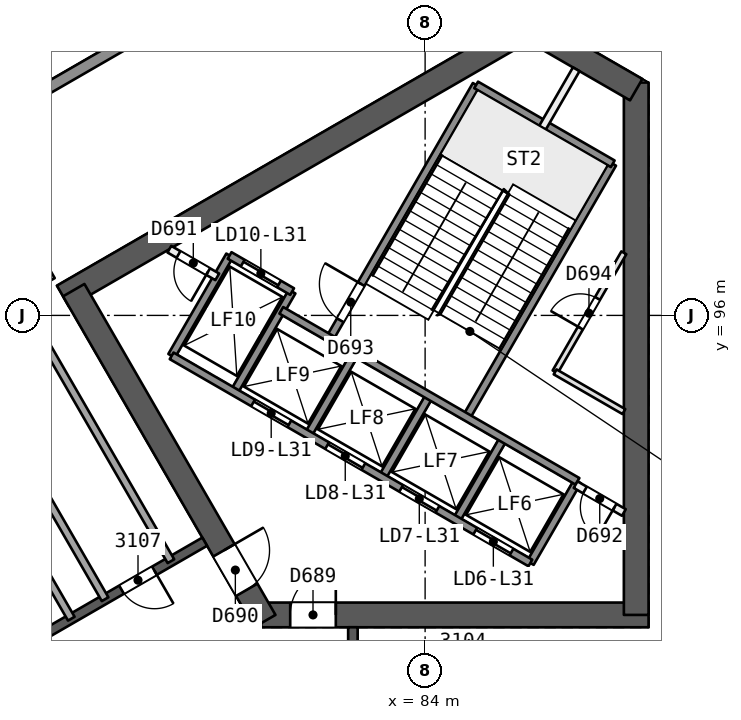
"""IFC4 building model, lengths in metres.
Left out: names, types, materials, properties, quantities, classifications, styles, units other than length and angle.
Written with IfcOpenShell. Run it as: python <this file> out.ifc"""

import sys

from ifc_helpers import new_model, si_unit, direction, frame, frame_2d, origin, place, context, subcontext, project, spatial, rectangle, extrude, element, fill, save


model = new_model("IFC4")
c1 = context("Model", 3, precision=1e-05, world=origin(), true_north=direction((0.0, 1.0)))
c2 = subcontext(c1, "Body", "Model", "MODEL_VIEW")
j1 = project(units=[si_unit("LENGTHUNIT", "METRE"), si_unit("PLANEANGLEUNIT", "RADIAN")], contexts=[c1])
p1 = place(None, origin())
s1 = spatial("IfcSite", under=j1, at=p1, CompositionType="ELEMENT")
p2 = place(p1, origin())
s2 = spatial("IfcBuilding", under=s1, at=p2, CompositionType="ELEMENT")
p3 = place(p2, frame((0.0, 0.0, 129.0)))
s3 = spatial("IfcBuildingStorey", under=s2, at=p3, CompositionType="ELEMENT", Elevation=129.0)
p4 = place(p3, frame((79.688, 88.119, 0.0), z_axis=(0.0, 0.0, 1.0), x_axis=(1.0, 0.0, 0.0)))
e1 = element("IfcWall", 1, at=p4, inside=s3, PredefinedType="SHEAR", context=c2, shape_type="SweptSolid", body=[
    extrude(rectangle(XDim=10.192, YDim=0.65, at=frame_2d((5.096, 0.0))), origin(), (0.0, 0.0, 1.0), 3.7),
])
p5 = place(p4, frame((0.762, 0.0, 0.0)))
e2 = element("IfcOpeningElement", 2, at=p5, cuts=e1, PredefinedType="OPENING", context=c2, shape_type="SweptSolid", body=[
    extrude(rectangle(XDim=1.2, YDim=2.1, at=frame_2d((0.6, 1.05))), frame((0.0, 0.335, 0.0), z_axis=(0.0, -1.0, 0.0), x_axis=(1.0, 0.0, 0.0)), (0.0, 0.0, 1.0), 0.671),
])
p6 = place(p3, frame((89.555, 88.119, 0.0), z_axis=(0.0, 0.0, 1.0), x_axis=(0.0, 1.0, 0.0)))
e3 = element("IfcWall", 3, at=p6, inside=s3, PredefinedType="SHEAR", context=c2, shape_type="SweptSolid", body=[
    extrude(rectangle(XDim=14.009, YDim=0.65, at=frame_2d((7.004, 0.0))), origin(), (0.0, 0.0, 1.0), 3.7),
])
p7 = place(p3, frame((89.555, 101.94, 0.0), z_axis=(0.0, 0.0, 1.0), x_axis=(-0.866031550877, 0.499989352773, 0.0)))
e4 = element("IfcWall", 4, at=p7, inside=s3, PredefinedType="SHEAR", context=c2, shape_type="SweptSolid", body=[
    extrude(rectangle(XDim=3.458, YDim=0.65, at=frame_2d((1.729, 0.0))), origin(), (0.0, 0.0, 1.0), 3.7),
])
p8 = place(p3, frame((86.723, 103.575, 0.0), z_axis=(0.0, 0.0, 1.0), x_axis=(-0.866031824457, -0.499988878904, 0.0)))
e5 = element("IfcWall", 5, at=p8, inside=s3, PredefinedType="SHEAR", context=c2, shape_type="SweptSolid", body=[
    extrude(rectangle(XDim=14.146, YDim=0.65, at=frame_2d((7.073, 0.0))), origin(), (0.0, 0.0, 1.0), 3.7),
])
p9 = place(p3, frame((74.754, 96.665, 0.0), z_axis=(0.0, 0.0, 1.0), x_axis=(0.500011799426, -0.866018591275, 0.0)))
e6 = element("IfcWall", 6, at=p9, inside=s3, PredefinedType="SHEAR", context=c2, shape_type="SweptSolid", body=[
    extrude(rectangle(XDim=10.055, YDim=0.65, at=frame_2d((5.027, 0.0))), origin(), (0.0, 0.0, 1.0), 3.7),
])
p10 = place(p9, frame((7.905, 0.0, 0.0)))
e7 = element("IfcOpeningElement", 7, at=p10, cuts=e6, PredefinedType="OPENING", context=c2, shape_type="SweptSolid", body=[
    extrude(rectangle(XDim=1.2, YDim=2.1, at=frame_2d((0.6, 1.05))), frame((0.0, 0.335, 0.0), z_axis=(0.0, -1.0, 0.0), x_axis=(1.0, 0.0, 0.0)), (0.0, 0.0, 1.0), 0.671),
])
p11 = place(p3, frame((82.1, 72.206, 0.0), z_axis=(0.0, 0.0, 1.0), x_axis=(0.0, 1.0, 0.0)))
e8 = element("IfcWall", 8, at=p11, inside=s3, PredefinedType="SHEAR", context=c2, shape_type="SweptSolid", body=[
    extrude(rectangle(XDim=15.588, YDim=0.25, at=frame_2d((7.794, 0.0))), origin(), (0.0, 0.0, 1.0), 3.25),
])
p12 = place(p11, frame((2.206, 0.0, 0.0)))
e9 = element("IfcOpeningElement", 9, at=p12, cuts=e8, PredefinedType="OPENING", context=c2, shape_type="SweptSolid", body=[
    extrude(rectangle(XDim=1.2, YDim=2.4, at=frame_2d((0.6, 1.2))), frame((0.0, 0.135, 0.0), z_axis=(0.0, -1.0, 0.0), x_axis=(1.0, 0.0, 0.0)), (0.0, 0.0, 1.0), 0.271),
])
p13 = place(p11, frame((8.003, 0.0, 0.0)))
e10 = element("IfcOpeningElement", 10, at=p13, cuts=e8, PredefinedType="OPENING", context=c2, shape_type="SweptSolid", body=[
    extrude(rectangle(XDim=1.1, YDim=2.1, at=frame_2d((0.55, 1.05))), frame((0.0, 0.135, 0.0), z_axis=(0.0, -1.0, 0.0), x_axis=(1.0, 0.0, 0.0)), (0.0, 0.0, 1.0), 0.271),
])
p14 = place(p11, frame((9.871, 0.0, 0.0)))
e11 = element("IfcOpeningElement", 11, at=p14, cuts=e8, PredefinedType="OPENING", context=c2, shape_type="SweptSolid", body=[
    extrude(rectangle(XDim=1.0, YDim=2.1, at=frame_2d((0.5, 1.05))), frame((0.0, 0.135, 0.0), z_axis=(0.0, -1.0, 0.0), x_axis=(1.0, 0.0, 0.0)), (0.0, 0.0, 1.0), 0.271),
])
p15 = place(p3, frame((78.2, 90.046, 0.0), z_axis=(0.0, 0.0, 1.0), x_axis=(-0.866026492143, -0.499998114903, 0.0)))
e12 = element("IfcWall", 12, at=p15, inside=s3, PredefinedType="SHEAR", context=c2, shape_type="SweptSolid", body=[
    extrude(rectangle(XDim=15.588, YDim=0.25, at=frame_2d((7.794, 0.0))), origin(), (0.0, 0.0, 1.0), 3.25),
])
p16 = place(p15, frame((1.527, 0.0, 0.0)))
e13 = element("IfcOpeningElement", 13, at=p16, cuts=e12, PredefinedType="OPENING", context=c2, shape_type="SweptSolid", body=[
    extrude(rectangle(XDim=1.0, YDim=2.1, at=frame_2d((0.5, 1.05))), frame((0.0, 0.135, 0.0), z_axis=(0.0, -1.0, 0.0), x_axis=(1.0, 0.0, 0.0)), (0.0, 0.0, 1.0), 0.271),
])
p17 = place(p15, frame((8.694, 0.0, 0.0)))
e14 = element("IfcOpeningElement", 14, at=p17, cuts=e12, PredefinedType="OPENING", context=c2, shape_type="SweptSolid", body=[
    extrude(rectangle(XDim=1.1, YDim=2.1, at=frame_2d((0.55, 1.05))), frame((0.0, 0.135, 0.0), z_axis=(0.0, -1.0, 0.0), x_axis=(1.0, 0.0, 0.0)), (0.0, 0.0, 1.0), 0.271),
])
p18 = place(p15, frame((13.062, 0.0, 0.0)))
e15 = element("IfcOpeningElement", 15, at=p18, cuts=e12, PredefinedType="OPENING", context=c2, shape_type="SweptSolid", body=[
    extrude(rectangle(XDim=1.0, YDim=2.1, at=frame_2d((0.5, 1.05))), frame((0.0, 0.135, 0.0), z_axis=(0.0, -1.0, 0.0), x_axis=(1.0, 0.0, 0.0)), (0.0, 0.0, 1.0), 0.271),
])
p19 = place(p3, frame((85.0, 87.595, 0.0), z_axis=(0.0, 0.0, 1.0), x_axis=(0.0, -1.0, 0.0)))
e16 = element("IfcWall", 16, at=p19, inside=s3, PredefinedType="PARTITIONING", context=c2, shape_type="SweptSolid", body=[
    extrude(rectangle(XDim=2.401, YDim=0.15, at=frame_2d((1.2, 0.0))), origin(), (0.0, 0.0, 1.0), 3.25),
])
p20 = place(p19, frame((0.801, 0.0, 0.0)))
e17 = element("IfcOpeningElement", 17, at=p20, cuts=e16, PredefinedType="OPENING", context=c2, shape_type="SweptSolid", body=[
    extrude(rectangle(XDim=0.8, YDim=2.1, at=frame_2d((0.4, 1.05))), frame((0.0, 0.085, 0.0), z_axis=(0.0, -1.0, 0.0), x_axis=(1.0, 0.0, 0.0)), (0.0, 0.0, 1.0), 0.171),
])
p21 = place(p3, frame((74.21, 96.956, 0.0), z_axis=(0.0, 0.0, 1.0), x_axis=(-0.49995489152, 0.866051445611, 0.0)))
e18 = element("IfcWall", 18, at=p21, inside=s3, PredefinedType="PARTITIONING", context=c2, shape_type="SweptSolid", body=[
    extrude(rectangle(XDim=4.273, YDim=0.1, at=frame_2d((2.137, 0.0))), origin(), (0.0, 0.0, 1.0), 3.25),
])
p22 = place(p21, frame((1.687, 0.0, 0.0)))
e19 = element("IfcOpeningElement", 19, at=p22, cuts=e18, PredefinedType="OPENING", context=c2, shape_type="SweptSolid", body=[
    extrude(rectangle(XDim=0.9, YDim=2.1, at=frame_2d((0.45, 1.05))), frame((0.0, 0.061, 0.0), z_axis=(0.0, -1.0, 0.0), x_axis=(1.0, 0.0, 0.0)), (0.0, 0.0, 1.0), 0.121),
])
for number, where, z_axis, x_axis in (
    (20, (75.579, 88.533, 0.0), (0.0, 0.0, 1.0), (-0.5, 0.866, 0.0)),
    (21, (72.811, 97.327, 0.0), (0.0, 0.0, 1.0), (0.5, -0.866, 0.0)),
):
    element("IfcWall", number, at=place(p3, frame(where, z_axis=z_axis, x_axis=x_axis)), inside=s3, PredefinedType="PARTITIONING", context=c2, shape_type="SweptSolid", body=[
        extrude(rectangle(XDim=9.0, YDim=0.2, at=frame_2d((4.5, 0.0))), origin(), (0.0, 0.0, 1.0), 3.25),
    ])
p23 = place(p3, frame((68.564, 98.63, 0.0), z_axis=(0.0, 0.0, 1.0), x_axis=(0.499988083099, -0.866032283901, 0.0)))
e22 = element("IfcWall", 22, at=p23, inside=s3, PredefinedType="PARTITIONING", context=c2, shape_type="SweptSolid", body=[
    extrude(rectangle(XDim=12.252, YDim=0.2, at=frame_2d((6.126, 0.0))), origin(), (0.0, 0.0, 1.0), 3.25),
])
p24 = place(p3, frame((40.967, 82.869, 0.0), z_axis=(0.0, 0.0, 1.0), x_axis=(0.86602616217, 0.499998686435, 0.0)))
e23 = element("IfcWall", 23, at=p24, inside=s3, PredefinedType="SOLIDWALL", context=c2, shape_type="SweptSolid", body=[
    extrude(rectangle(XDim=56.079, YDim=0.3, at=frame_2d((28.04, 0.0))), origin(), (0.0, 0.0, 1.0), 3.25),
])
p25 = place(p24, frame((26.839, 0.0, 0.0)))
e24 = element("IfcOpeningElement", 24, at=p25, cuts=e23, PredefinedType="OPENING", context=c2, shape_type="SweptSolid", body=[
    extrude(rectangle(XDim=2.4, YDim=2.4, at=frame_2d((1.2, 1.2))), frame((0.0, 0.161, 0.0), z_axis=(0.0, -1.0, 0.0), x_axis=(1.0, 0.0, 0.0)), (0.0, 0.0, 1.0), 0.321),
])
p26 = place(p24, frame((32.607, 0.0, 0.0)))
e25 = element("IfcOpeningElement", 25, at=p26, cuts=e23, PredefinedType="OPENING", context=c2, shape_type="SweptSolid", body=[
    extrude(rectangle(XDim=2.4, YDim=2.4, at=frame_2d((1.2, 1.2))), frame((0.0, 0.161, 0.0), z_axis=(0.0, -1.0, 0.0), x_axis=(1.0, 0.0, 0.0)), (0.0, 0.0, 1.0), 0.321),
])
p27 = place(p24, frame((43.547, 0.0, 0.0)))
e26 = element("IfcOpeningElement", 26, at=p27, cuts=e23, PredefinedType="OPENING", context=c2, shape_type="SweptSolid", body=[
    extrude(rectangle(XDim=2.4, YDim=2.4, at=frame_2d((1.2, 1.2))), frame((0.0, 0.161, 0.0), z_axis=(0.0, -1.0, 0.0), x_axis=(1.0, 0.0, 0.0)), (0.0, 0.0, 1.0), 0.321),
])
p28 = place(p24, frame((21.072, 0.0, 0.0)))
e27 = element("IfcOpeningElement", 27, at=p28, cuts=e23, PredefinedType="OPENING", context=c2, shape_type="SweptSolid", body=[
    extrude(rectangle(XDim=2.4, YDim=2.4, at=frame_2d((1.2, 1.2))), frame((0.0, 0.161, 0.0), z_axis=(0.0, -1.0, 0.0), x_axis=(1.0, 0.0, 0.0)), (0.0, 0.0, 1.0), 0.321),
])
p29 = place(p24, frame((10.136, 0.0, 0.0)))
e28 = element("IfcOpeningElement", 28, at=p29, cuts=e23, PredefinedType="OPENING", context=c2, shape_type="SweptSolid", body=[
    extrude(rectangle(XDim=2.4, YDim=2.4, at=frame_2d((1.2, 1.2))), frame((0.0, 0.161, 0.0), z_axis=(0.0, -1.0, 0.0), x_axis=(1.0, 0.0, 0.0)), (0.0, 0.0, 1.0), 0.321),
])
p30 = place(p3, frame((86.77, 89.486, 0.0), z_axis=(0.0, 0.0, 1.0), x_axis=(0.499961042966, 0.86604789447, 0.0)))
e29 = element("IfcWall", 29, at=p30, inside=s3, PredefinedType="SOLIDWALL", context=c2, shape_type="SweptSolid", body=[
    extrude(rectangle(XDim=2.48, YDim=0.2, at=frame_2d((1.24, 0.0))), origin(), (0.0, 0.0, 1.0), 3.25),
])
p31 = place(p3, frame((87.421, 94.514, 0.0), z_axis=(0.0, 0.0, 1.0), x_axis=(0.499993116331, 0.866029378036, 0.0)))
e30 = element("IfcWall", 30, at=p31, inside=s3, PredefinedType="PARTITIONING", context=c2, shape_type="SweptSolid", body=[
    extrude(rectangle(XDim=3.618, YDim=0.15, at=frame_2d((1.809, 0.0))), origin(), (0.0, 0.0, 1.0), 3.25),
])
p32 = place(p31, frame((1.332, 0.0, 0.0)))
e31 = element("IfcOpeningElement", 31, at=p32, cuts=e30, PredefinedType="OPENING", context=c2, shape_type="SweptSolid", body=[
    extrude(rectangle(XDim=0.9, YDim=2.1, at=frame_2d((0.45, 1.05))), frame((0.0, 0.085, 0.0), z_axis=(0.0, -1.0, 0.0), x_axis=(1.0, 0.0, 0.0)), (0.0, 0.0, 1.0), 0.171),
])
p33 = place(p3, frame((84.821, 90.611, 0.0), z_axis=(0.0, 0.0, 1.0), x_axis=(0.499961042966, 0.86604789447, 0.0)))
e32 = element("IfcWall", 32, at=p33, inside=s3, PredefinedType="SOLIDWALL", context=c2, shape_type="SweptSolid", body=[
    extrude(rectangle(XDim=2.48, YDim=0.2, at=frame_2d((1.24, 0.0))), origin(), (0.0, 0.0, 1.0), 3.25),
])
p34 = place(p3, frame((85.087, 93.321, 0.0), z_axis=(0.0, 0.0, 1.0), x_axis=(0.500019787375, 0.866013979237, 0.0)))
e33 = element("IfcWall", 33, at=p34, inside=s3, PredefinedType="SOLIDWALL", context=c2, shape_type="SweptSolid", body=[
    extrude(rectangle(XDim=7.7, YDim=0.2, at=frame_2d((3.85, 0.0))), origin(), (0.0, 0.0, 1.0), 3.25),
])
p35 = place(p3, frame((82.873, 91.736, 0.0), z_axis=(0.0, 0.0, 1.0), x_axis=(0.499961042966, 0.86604789447, 0.0)))
e34 = element("IfcWall", 34, at=p35, inside=s3, PredefinedType="SOLIDWALL", context=c2, shape_type="SweptSolid", body=[
    extrude(rectangle(XDim=2.48, YDim=0.2, at=frame_2d((1.24, 0.0))), origin(), (0.0, 0.0, 1.0), 3.25),
])
p36 = place(p3, frame((87.09, 100.94, 0.0), z_axis=(0.0, 0.0, 1.0), x_axis=(0.499944938281, 0.866057191349, 0.0)))
e35 = element("IfcWall", 35, at=p36, inside=s3, PredefinedType="PARTITIONING", context=c2, shape_type="SweptSolid", body=[
    extrude(rectangle(XDim=1.773, YDim=0.2, at=frame_2d((0.887, 0.0))), origin(), (0.0, 0.0, 1.0), 3.25),
])
p37 = place(p3, frame((80.924, 92.861, 0.0), z_axis=(0.0, 0.0, 1.0), x_axis=(0.499961042966, 0.86604789447, 0.0)))
e36 = element("IfcWall", 36, at=p37, inside=s3, PredefinedType="SOLIDWALL", context=c2, shape_type="SweptSolid", body=[
    extrude(rectangle(XDim=2.48, YDim=0.2, at=frame_2d((1.24, 0.0))), origin(), (0.0, 0.0, 1.0), 3.25),
])
p38 = place(p3, frame((81.493, 95.396, 0.0), z_axis=(0.0, 0.0, 1.0), x_axis=(0.500006057782, 0.866021906294, 0.0)))
e37 = element("IfcWall", 37, at=p38, inside=s3, PredefinedType="SOLIDWALL", context=c2, shape_type="SweptSolid", body=[
    extrude(rectangle(XDim=7.7, YDim=0.2, at=frame_2d((3.85, 0.0))), origin(), (0.0, 0.0, 1.0), 3.25),
])
p39 = place(p38, frame((0.55, 0.0, 0.0)))
e38 = element("IfcOpeningElement", 38, at=p39, cuts=e37, PredefinedType="OPENING", context=c2, shape_type="SweptSolid", body=[
    extrude(rectangle(XDim=1.1, YDim=2.1, at=frame_2d((0.55, 1.05))), frame((0.0, 0.11, 0.0), z_axis=(0.0, -1.0, 0.0), x_axis=(1.0, 0.0, 0.0)), (0.0, 0.0, 1.0), 0.221),
])
for number, where, z_axis, x_axis in (
    (39, (78.976, 93.986, 0.0), (0.0, 0.0, 1.0), (0.5, 0.866, 0.0)),
    (40, (77.33, 94.936, 0.0), (0.0, 0.0, 1.0), (0.5, 0.866, 0.0)),
):
    element("IfcWall", number, at=place(p3, frame(where, z_axis=z_axis, x_axis=x_axis)), inside=s3, PredefinedType="SOLIDWALL", context=c2, shape_type="SweptSolid", body=[
        extrude(rectangle(XDim=3.05, YDim=0.2, at=frame_2d((1.525, 0.0))), origin(), (0.0, 0.0, 1.0), 3.25),
    ])
p40 = place(p3, frame((86.77, 89.486, 0.0), z_axis=(0.0, 0.0, 1.0), x_axis=(-0.86601811187, 0.500012629753, 0.0)))
e41 = element("IfcWall", 41, at=p40, inside=s3, PredefinedType="SOLIDWALL", context=c2, shape_type="SweptSolid", body=[
    extrude(rectangle(XDim=10.9, YDim=0.2, at=frame_2d((5.45, 0.0))), origin(), (0.0, 0.0, 1.0), 3.25),
])
p41 = place(p40, frame((0.575, 0.0, 0.0)))
e42 = element("IfcOpeningElement", 42, at=p41, cuts=e41, PredefinedType="OPENING", context=c2, shape_type="SweptSolid", body=[
    extrude(rectangle(XDim=1.1, YDim=2.1, at=frame_2d((0.55, 1.05))), frame((0.0, 0.11, 0.0), z_axis=(0.0, -1.0, 0.0), x_axis=(1.0, 0.0, 0.0)), (0.0, 0.0, 1.0), 0.221),
])
p42 = place(p40, frame((2.825, 0.0, 0.0)))
e43 = element("IfcOpeningElement", 43, at=p42, cuts=e41, PredefinedType="OPENING", context=c2, shape_type="SweptSolid", body=[
    extrude(rectangle(XDim=1.1, YDim=2.1, at=frame_2d((0.55, 1.05))), frame((0.0, 0.11, 0.0), z_axis=(0.0, -1.0, 0.0), x_axis=(1.0, 0.0, 0.0)), (0.0, 0.0, 1.0), 0.221),
])
p43 = place(p40, frame((5.075, 0.0, 0.0)))
e44 = element("IfcOpeningElement", 44, at=p43, cuts=e41, PredefinedType="OPENING", context=c2, shape_type="SweptSolid", body=[
    extrude(rectangle(XDim=1.1, YDim=2.1, at=frame_2d((0.55, 1.05))), frame((0.0, 0.11, 0.0), z_axis=(0.0, -1.0, 0.0), x_axis=(1.0, 0.0, 0.0)), (0.0, 0.0, 1.0), 0.221),
])
p44 = place(p40, frame((7.325, 0.0, 0.0)))
e45 = element("IfcOpeningElement", 45, at=p44, cuts=e41, PredefinedType="OPENING", context=c2, shape_type="SweptSolid", body=[
    extrude(rectangle(XDim=1.1, YDim=2.1, at=frame_2d((0.55, 1.05))), frame((0.0, 0.11, 0.0), z_axis=(0.0, -1.0, 0.0), x_axis=(1.0, 0.0, 0.0)), (0.0, 0.0, 1.0), 0.221),
])
p45 = place(p3, frame((89.23, 90.814, 0.0), z_axis=(0.0, 0.0, 1.0), x_axis=(-0.866022048785, 0.500005810984, 0.0)))
e46 = element("IfcWall", 46, at=p45, inside=s3, PredefinedType="PARTITIONING", context=c2, shape_type="SweptSolid", body=[
    extrude(rectangle(XDim=1.467, YDim=0.2, at=frame_2d((0.733, 0.0))), origin(), (0.0, 0.0, 1.0), 3.25),
])
p46 = place(p45, frame((0.283, 0.0, 0.0)))
e47 = element("IfcOpeningElement", 47, at=p46, cuts=e46, PredefinedType="OPENING", context=c2, shape_type="SweptSolid", body=[
    extrude(rectangle(XDim=0.9, YDim=2.1, at=frame_2d((0.45, 1.05))), frame((0.0, 0.11, 0.0), z_axis=(0.0, -1.0, 0.0), x_axis=(1.0, 0.0, 0.0)), (0.0, 0.0, 1.0), 0.221),
])
p47 = place(p3, frame((78.53, 97.014, 0.0), z_axis=(0.0, 0.0, 1.0), x_axis=(-0.866045896294, 0.499964504253, 0.0)))
e48 = element("IfcWall", 48, at=p47, inside=s3, PredefinedType="PARTITIONING", context=c2, shape_type="SweptSolid", body=[
    extrude(rectangle(XDim=1.455, YDim=0.2, at=frame_2d((0.728, 0.0))), origin(), (0.0, 0.0, 1.0), 3.25),
])
p48 = place(p47, frame((0.278, 0.0, 0.0)))
e49 = element("IfcOpeningElement", 49, at=p48, cuts=e48, PredefinedType="OPENING", context=c2, shape_type="SweptSolid", body=[
    extrude(rectangle(XDim=0.9, YDim=2.1, at=frame_2d((0.45, 1.05))), frame((0.0, 0.11, 0.0), z_axis=(0.0, -1.0, 0.0), x_axis=(1.0, 0.0, 0.0)), (0.0, 0.0, 1.0), 0.221),
])
p49 = place(p3, frame((88.01, 91.634, 0.0), z_axis=(0.0, 0.0, 1.0), x_axis=(-0.866024315419, 0.5000018851, 0.0)))
e50 = element("IfcWall", 50, at=p49, inside=s3, PredefinedType="SOLIDWALL", context=c2, shape_type="SweptSolid", body=[
    extrude(rectangle(XDim=9.0, YDim=0.2, at=frame_2d((4.5, 0.0))), origin(), (0.0, 0.0, 1.0), 3.25),
])
p50 = place(p3, frame((80.5, 96.627, 0.0), z_axis=(0.0, 0.0, 1.0), x_axis=(-0.86601224135, 0.500022797313, 0.0)))
e51 = element("IfcWall", 51, at=p50, inside=s3, PredefinedType="SOLIDWALL", context=c2, shape_type="SweptSolid", body=[
    extrude(rectangle(XDim=1.9, YDim=0.2, at=frame_2d((0.95, 0.0))), origin(), (0.0, 0.0, 1.0), 3.25),
])
p51 = place(p50, frame((0.4, 0.0, 0.0)))
e52 = element("IfcOpeningElement", 52, at=p51, cuts=e51, PredefinedType="OPENING", context=c2, shape_type="SweptSolid", body=[
    extrude(rectangle(XDim=1.1, YDim=2.1, at=frame_2d((0.55, 1.05))), frame((0.0, 0.11, 0.0), z_axis=(0.0, -1.0, 0.0), x_axis=(1.0, 0.0, 0.0)), (0.0, 0.0, 1.0), 0.221),
])
p52 = place(p3, frame((89.23, 93.469, 0.0), z_axis=(0.0, 0.0, 1.0), x_axis=(-0.866004557827, 0.500036104519, 0.0)))
e53 = element("IfcWall", 53, at=p52, inside=s3, PredefinedType="PARTITIONING", context=c2, shape_type="SweptSolid", body=[
    extrude(rectangle(XDim=2.089, YDim=0.15, at=frame_2d((1.044, 0.0))), origin(), (0.0, 0.0, 1.0), 3.25),
])
p53 = place(p3, frame((88.937, 99.99, 0.0), z_axis=(0.0, 0.0, 1.0), x_axis=(-0.866004344652, 0.500036473714, 0.0)))
e54 = element("IfcWall", 54, at=p53, inside=s3, PredefinedType="SOLIDWALL", context=c2, shape_type="SweptSolid", body=[
    extrude(rectangle(XDim=4.15, YDim=0.2, at=frame_2d((2.075, 0.0))), origin(), (0.0, 0.0, 1.0), 3.25),
])
p54 = place(p16, origin())
e55 = element("IfcDoor", 55, at=p54, inside=s3, OperationType="SINGLE_SWING_LEFT", PredefinedType="NOTDEFINED", context=c2, shape_type="SweptSolid", body=[
    extrude(rectangle(XDim=1.0, YDim=2.1, at=frame_2d((0.5, 1.05))), frame((0.0, 0.025, 0.0), z_axis=(0.0, -1.0, 0.0), x_axis=(1.0, 0.0, 0.0)), (0.0, 0.0, 1.0), 0.05),
])
fill(e13, e55)
p55 = place(p5, origin())
e56 = element("IfcDoor", 56, at=p55, inside=s3, OperationType="SINGLE_SWING_RIGHT", PredefinedType="NOTDEFINED", context=c2, shape_type="SweptSolid", body=[
    extrude(rectangle(XDim=1.2, YDim=2.1, at=frame_2d((0.6, 1.05))), frame((0.0, 0.025, 0.0), z_axis=(0.0, -1.0, 0.0), x_axis=(1.0, 0.0, 0.0)), (0.0, 0.0, 1.0), 0.05),
])
fill(e2, e56)
p56 = place(p10, origin())
e57 = element("IfcDoor", 57, at=p56, inside=s3, OperationType="SINGLE_SWING_LEFT", PredefinedType="NOTDEFINED", context=c2, shape_type="SweptSolid", body=[
    extrude(rectangle(XDim=1.2, YDim=2.1, at=frame_2d((0.6, 1.05))), frame((0.0, 0.025, 0.0), z_axis=(0.0, -1.0, 0.0), x_axis=(1.0, 0.0, 0.0)), (0.0, 0.0, 1.0), 0.05),
])
fill(e7, e57)
p57 = place(p41, origin())
e58 = element("IfcDoor", 58, at=p57, inside=s3, OperationType="SLIDING_TO_RIGHT", PredefinedType="NOTDEFINED", context=c2, shape_type="SweptSolid", body=[
    extrude(rectangle(XDim=1.1, YDim=2.1, at=frame_2d((0.55, 1.05))), frame((0.0, 0.025, 0.0), z_axis=(0.0, -1.0, 0.0), x_axis=(1.0, 0.0, 0.0)), (0.0, 0.0, 1.0), 0.05),
])
fill(e42, e58)
p58 = place(p42, origin())
e59 = element("IfcDoor", 59, at=p58, inside=s3, OperationType="SLIDING_TO_LEFT", PredefinedType="NOTDEFINED", context=c2, shape_type="SweptSolid", body=[
    extrude(rectangle(XDim=1.1, YDim=2.1, at=frame_2d((0.55, 1.05))), frame((0.0, 0.025, 0.0), z_axis=(0.0, -1.0, 0.0), x_axis=(1.0, 0.0, 0.0)), (0.0, 0.0, 1.0), 0.05),
])
fill(e43, e59)
p59 = place(p43, origin())
e60 = element("IfcDoor", 60, at=p59, inside=s3, OperationType="SLIDING_TO_RIGHT", PredefinedType="NOTDEFINED", context=c2, shape_type="SweptSolid", body=[
    extrude(rectangle(XDim=1.1, YDim=2.1, at=frame_2d((0.55, 1.05))), frame((0.0, 0.025, 0.0), z_axis=(0.0, -1.0, 0.0), x_axis=(1.0, 0.0, 0.0)), (0.0, 0.0, 1.0), 0.05),
])
fill(e44, e60)
p60 = place(p44, origin())
e61 = element("IfcDoor", 61, at=p60, inside=s3, OperationType="SLIDING_TO_LEFT", PredefinedType="NOTDEFINED", context=c2, shape_type="SweptSolid", body=[
    extrude(rectangle(XDim=1.1, YDim=2.1, at=frame_2d((0.55, 1.05))), frame((0.0, 0.025, 0.0), z_axis=(0.0, -1.0, 0.0), x_axis=(1.0, 0.0, 0.0)), (0.0, 0.0, 1.0), 0.05),
])
fill(e45, e61)
p61 = place(p51, origin())
e62 = element("IfcDoor", 62, at=p61, inside=s3, OperationType="SLIDING_TO_RIGHT", PredefinedType="NOTDEFINED", context=c2, shape_type="SweptSolid", body=[
    extrude(rectangle(XDim=1.1, YDim=2.1, at=frame_2d((0.55, 1.05))), frame((0.0, 0.025, 0.0), z_axis=(0.0, -1.0, 0.0), x_axis=(1.0, 0.0, 0.0)), (0.0, 0.0, 1.0), 0.05),
])
fill(e52, e62)
p62 = place(p48, origin())
e63 = element("IfcDoor", 63, at=p62, inside=s3, OperationType="SINGLE_SWING_LEFT", PredefinedType="NOTDEFINED", context=c2, shape_type="SweptSolid", body=[
    extrude(rectangle(XDim=0.9, YDim=2.1, at=frame_2d((0.45, 1.05))), frame((0.0, 0.025, 0.0), z_axis=(0.0, -1.0, 0.0), x_axis=(1.0, 0.0, 0.0)), (0.0, 0.0, 1.0), 0.05),
])
fill(e49, e63)
p63 = place(p46, origin())
e64 = element("IfcDoor", 64, at=p63, inside=s3, OperationType="SINGLE_SWING_LEFT", PredefinedType="NOTDEFINED", context=c2, shape_type="SweptSolid", body=[
    extrude(rectangle(XDim=0.9, YDim=2.1, at=frame_2d((0.45, 1.05))), frame((0.0, 0.025, 0.0), z_axis=(0.0, -1.0, 0.0), x_axis=(1.0, 0.0, 0.0)), (0.0, 0.0, 1.0), 0.05),
])
fill(e47, e64)
p64 = place(p39, origin())
e65 = element("IfcDoor", 65, at=p64, inside=s3, OperationType="SINGLE_SWING_RIGHT", PredefinedType="NOTDEFINED", context=c2, shape_type="SweptSolid", body=[
    extrude(rectangle(XDim=1.1, YDim=2.1, at=frame_2d((0.55, 1.05))), frame((0.0, 0.025, 0.0), z_axis=(0.0, -1.0, 0.0), x_axis=(1.0, 0.0, 0.0)), (0.0, 0.0, 1.0), 0.05),
])
fill(e38, e65)
p65 = place(p32, origin())
e66 = element("IfcDoor", 66, at=p65, inside=s3, OperationType="SINGLE_SWING_LEFT", PredefinedType="NOTDEFINED", context=c2, shape_type="SweptSolid", body=[
    extrude(rectangle(XDim=0.9, YDim=2.1, at=frame_2d((0.45, 1.05))), frame((0.0, 0.025, 0.0), z_axis=(0.0, -1.0, 0.0), x_axis=(1.0, 0.0, 0.0)), (0.0, 0.0, 1.0), 0.05),
])
fill(e31, e66)
save(model, sys.argv[1])
